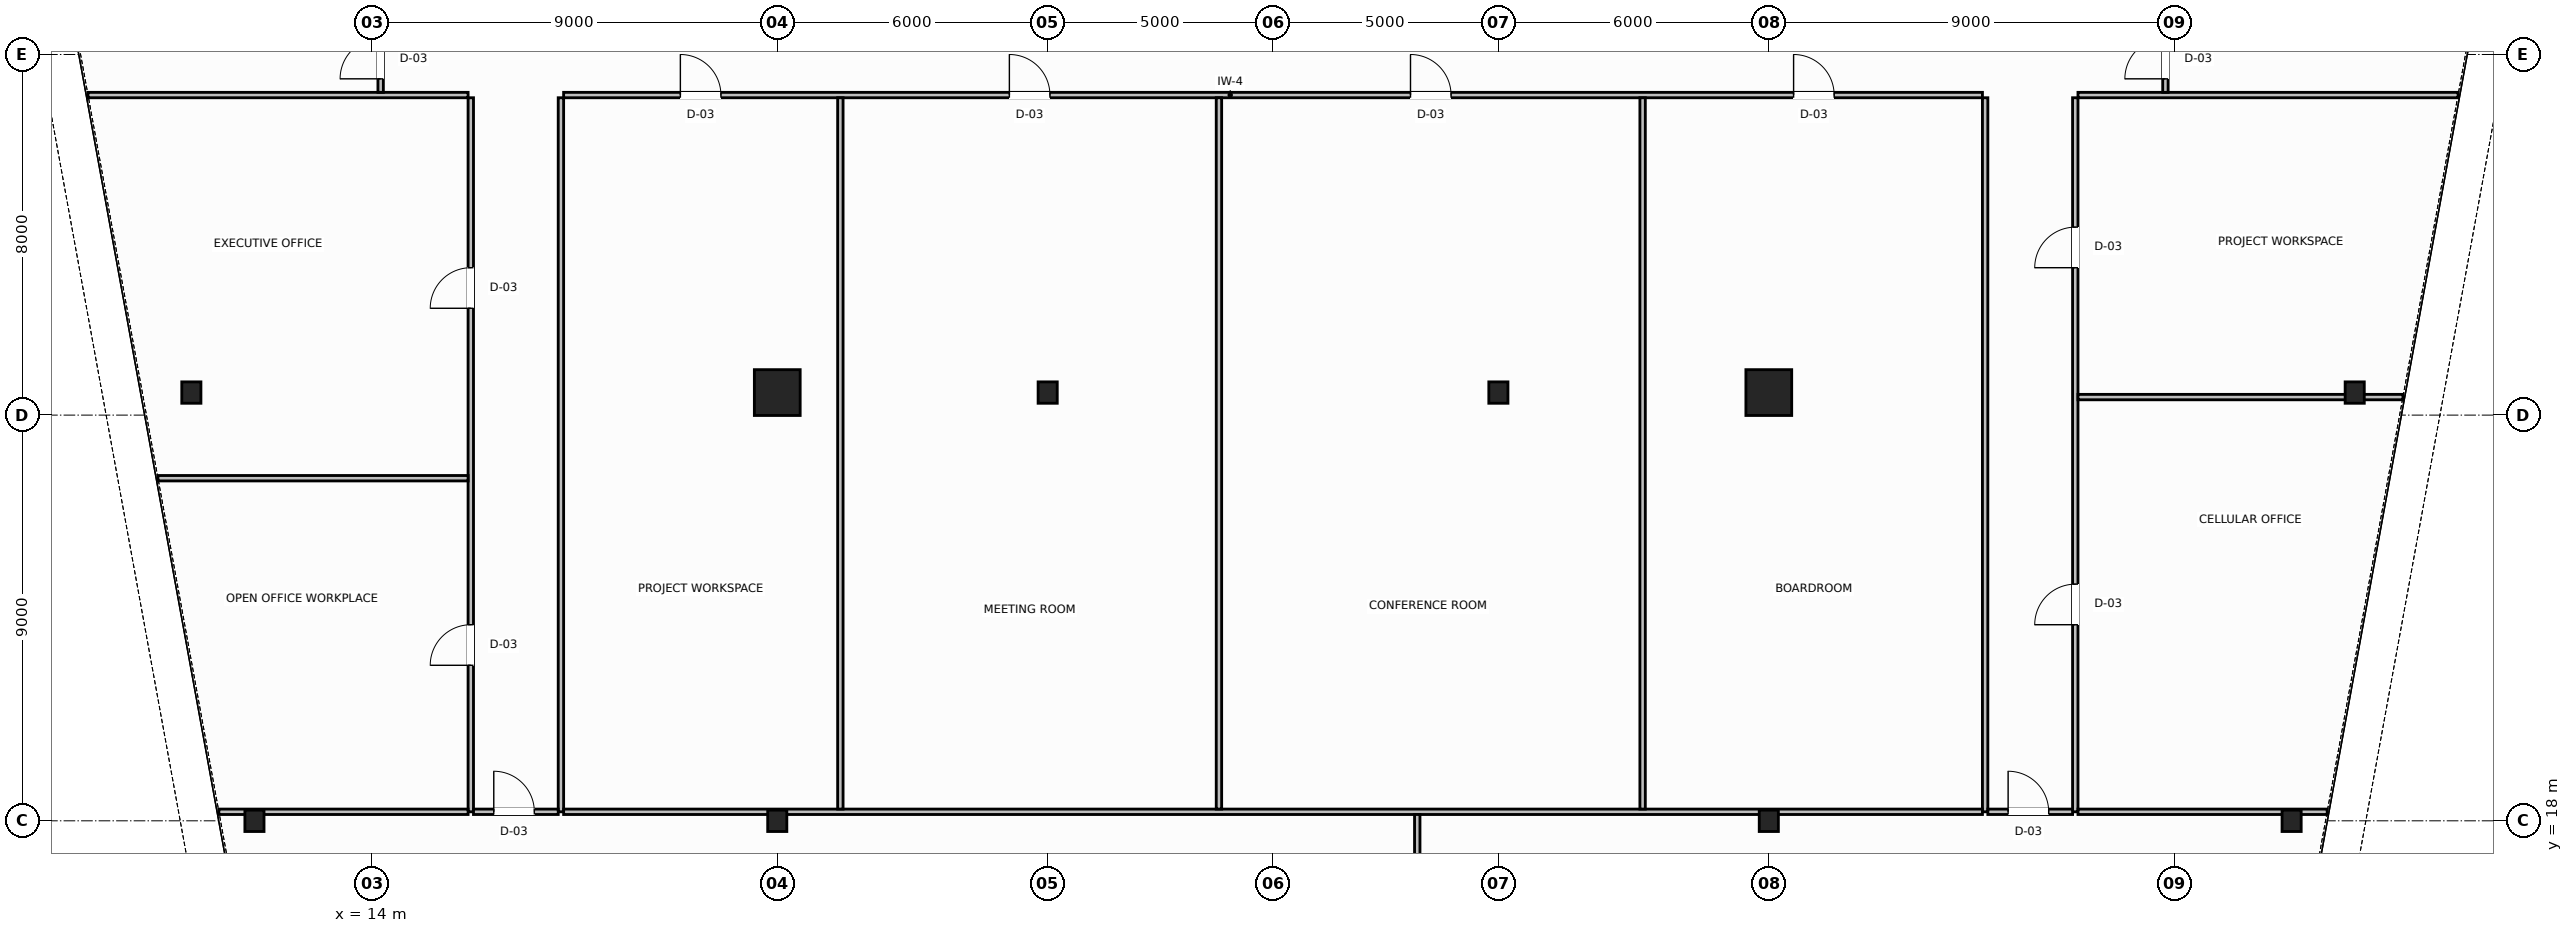
"""IFC4 building model, lengths in metres.
Left out: names, types, materials, properties, quantities, classifications, styles, units other than length and angle.
Written with IfcOpenShell. Run it as: python <this file> out.ifc"""

import sys

from ifc_helpers import new_model, si_unit, direction, frame, frame_2d, origin, origin_2d, place, context, subcontext, project, spatial, rectangle, hollow_circle, i_section, extrude, source, transform, mapped, element, fill, save


model = new_model("IFC4")
c1 = context("Model", 3, precision=1e-05, world=origin(), true_north=direction((0.0, 1.0)))
c2 = subcontext(c1, "Body", "Model", "MODEL_VIEW")
j1 = project(units=[si_unit("LENGTHUNIT", "METRE"), si_unit("PLANEANGLEUNIT", "RADIAN")], contexts=[c1])
p1 = place(None, origin())
s1 = spatial("IfcSite", under=j1, at=p1, CompositionType="ELEMENT")
p2 = place(p1, origin())
s2 = spatial("IfcBuilding", under=s1, at=p2, CompositionType="ELEMENT")
p3 = place(p2, frame((0.0, 0.0, 92.0)))
s3 = spatial("IfcBuildingStorey", under=s2, at=p3, CompositionType="ELEMENT", Elevation=92.0)
m1 = source(origin(), c2, "Body", "SweptSolid", [
    extrude(i_section(OverallWidth=0.424, OverallDepth=0.474, WebThickness=0.047, FlangeThickness=0.065, FilletRadius=0.015, at=origin_2d()), origin(), (0.0, 0.0, 1.0), 3.8),
])
for number, where, z_axis, x_axis in (
    (1, (10.0, 27.5, 0.0), (0.0, 0.0, 1.0), (1.0, 0.0, 0.0)),
    (2, (11.4, 18.0, 0.0), (0.0, 0.0, 1.0), (1.0, 0.0, 0.0)),
    (3, (58.0, 27.5, 0.0), (0.0, 0.0, 1.0), (1.0, 0.0, 0.0)),
    (4, (56.6, 18.0, 0.0), (0.0, 0.0, 1.0), (1.0, 0.0, 0.0)),
):
    element("IfcColumn", number, at=place(p3, frame(where, z_axis=z_axis, x_axis=x_axis)), inside=s3, PredefinedType="COLUMN", context=c2, shape_type="MappedRepresentation", body=[
        mapped(m1, transform((0.0, 0.0, 0.0), scale=1.0)),
    ])
m2 = source(origin(), c2, "Body", "SweptSolid", [
    extrude(hollow_circle(Radius=0.508, WallThickness=0.045, at=origin_2d()), origin(), (0.0, 0.0, 1.0), 3.8),
])
p4 = place(p3, frame((23.0, 27.5, 0.0), z_axis=(0.0, 0.0, 1.0), x_axis=(1.0, 0.0, 0.0)))
e5 = element("IfcColumn", 5, at=p4, inside=s3, PredefinedType="COLUMN", context=c2, shape_type="MappedRepresentation", body=[
    mapped(m2, transform((0.0, 0.0, 0.0), scale=1.0)),
])
m3 = source(origin(), c2, "Body", "SweptSolid", [
    extrude(i_section(OverallWidth=0.424, OverallDepth=0.474, WebThickness=0.047, FlangeThickness=0.065, FilletRadius=0.015, at=origin_2d()), origin(), (0.0, 0.0, 1.0), 3.8),
])
for number, where, z_axis, x_axis in (
    (6, (29.0, 27.5, 0.0), (0.0, 0.0, 1.0), (1.0, 0.0, 0.0)),
    (7, (39.0, 27.5, 0.0), (0.0, 0.0, 1.0), (1.0, 0.0, 0.0)),
):
    element("IfcColumn", number, at=place(p3, frame(where, z_axis=z_axis, x_axis=x_axis)), inside=s3, PredefinedType="COLUMN", context=c2, shape_type="MappedRepresentation", body=[
        mapped(m3, transform((0.0, 0.0, 0.0), scale=1.0)),
    ])
p5 = place(p3, frame((45.0, 27.5, 0.0), z_axis=(0.0, 0.0, 1.0), x_axis=(1.0, 0.0, 0.0)))
e8 = element("IfcColumn", 8, at=p5, inside=s3, PredefinedType="COLUMN", context=c2, shape_type="MappedRepresentation", body=[
    mapped(m2, transform((0.0, 0.0, 0.0), scale=1.0)),
])
for number, where, z_axis, x_axis in (
    (9, (23.0, 18.0, 0.0), (0.0, 0.0, 1.0), (1.0, 0.0, 0.0)),
    (10, (45.0, 18.0, 0.0), (0.0, 0.0, 1.0), (1.0, 0.0, 0.0)),
):
    element("IfcColumn", number, at=place(p3, frame(where, z_axis=z_axis, x_axis=x_axis)), inside=s3, PredefinedType="COLUMN", context=c2, shape_type="MappedRepresentation", body=[
        mapped(m3, transform((0.0, 0.0, 0.0), scale=1.0)),
    ])
p6 = place(p3, frame((18.26, 34.1, 0.0), z_axis=(0.0, 0.0, 1.0), x_axis=(1.0, 0.0, 0.0)))
e11 = element("IfcWall", 11, at=p6, inside=s3, PredefinedType="PARTITIONING", context=c2, shape_type="SweptSolid", body=[
    extrude(rectangle(XDim=31.48, YDim=0.12, at=frame_2d((15.74, 0.0))), origin(), (0.0, 0.0, 1.0), 3.58),
])
p7 = place(p6, frame((2.59, 0.0, 0.0)))
e12 = element("IfcOpeningElement", 12, at=p7, cuts=e11, PredefinedType="OPENING", context=c2, shape_type="SweptSolid", body=[
    extrude(rectangle(XDim=0.9, YDim=2.15, at=frame_2d((0.45, 1.075))), frame((0.0, 0.07, 0.0), z_axis=(0.0, -1.0, 0.0), x_axis=(1.0, 0.0, 0.0)), (0.0, 0.0, 1.0), 0.14),
])
p8 = place(p6, frame((9.89, 0.0, 0.0)))
e13 = element("IfcOpeningElement", 13, at=p8, cuts=e11, PredefinedType="OPENING", context=c2, shape_type="SweptSolid", body=[
    extrude(rectangle(XDim=0.9, YDim=2.15, at=frame_2d((0.45, 1.075))), frame((0.0, 0.07, 0.0), z_axis=(0.0, -1.0, 0.0), x_axis=(1.0, 0.0, 0.0)), (0.0, 0.0, 1.0), 0.14),
])
p9 = place(p6, frame((18.79, 0.0, 0.0)))
e14 = element("IfcOpeningElement", 14, at=p9, cuts=e11, PredefinedType="OPENING", context=c2, shape_type="SweptSolid", body=[
    extrude(rectangle(XDim=0.9, YDim=2.15, at=frame_2d((0.45, 1.075))), frame((0.0, 0.07, 0.0), z_axis=(0.0, -1.0, 0.0), x_axis=(1.0, 0.0, 0.0)), (0.0, 0.0, 1.0), 0.14),
])
p10 = place(p6, frame((27.29, 0.0, 0.0)))
e15 = element("IfcOpeningElement", 15, at=p10, cuts=e11, PredefinedType="OPENING", context=c2, shape_type="SweptSolid", body=[
    extrude(rectangle(XDim=0.9, YDim=2.15, at=frame_2d((0.45, 1.075))), frame((0.0, 0.07, 0.0), z_axis=(0.0, -1.0, 0.0), x_axis=(1.0, 0.0, 0.0)), (0.0, 0.0, 1.0), 0.14),
])
for number, where, z_axis, x_axis in (
    (16, (7.706, 34.1, 0.0), (0.0, 0.0, 1.0), (1.0, 0.0, 0.0)),
    (17, (51.86, 34.1, 0.0), (0.0, 0.0, 1.0), (1.0, 0.0, 0.0)),
):
    element("IfcWall", number, at=place(p3, frame(where, z_axis=z_axis, x_axis=x_axis)), inside=s3, PredefinedType="PARTITIONING", context=c2, shape_type="SweptSolid", body=[
        extrude(rectangle(XDim=8.434, YDim=0.12, at=frame_2d((4.217, 0.0))), origin(), (0.0, 0.0, 1.0), 3.58),
    ])
p11 = place(p3, frame((14.2, 34.16, 0.0), z_axis=(0.0, 0.0, 1.0), x_axis=(0.0, 1.0, 0.0)))
e18 = element("IfcWall", 18, at=p11, inside=s3, PredefinedType="PARTITIONING", context=c2, shape_type="SweptSolid", body=[
    extrude(rectangle(XDim=2.28, YDim=0.12, at=frame_2d((1.14, 0.0))), origin(), (0.0, 0.0, 1.0), 3.58),
])
p12 = place(p11, frame((0.3, 0.0, 0.0)))
e19 = element("IfcOpeningElement", 19, at=p12, cuts=e18, PredefinedType="OPENING", context=c2, shape_type="SweptSolid", body=[
    extrude(rectangle(XDim=0.9, YDim=2.15, at=frame_2d((0.45, 1.075))), frame((0.0, 0.07, 0.0), z_axis=(0.0, -1.0, 0.0), x_axis=(1.0, 0.0, 0.0)), (0.0, 0.0, 1.0), 0.14),
])
p13 = place(p3, frame((53.8, 34.16, 0.0), z_axis=(0.0, 0.0, 1.0), x_axis=(0.0, 1.0, 0.0)))
e20 = element("IfcWall", 20, at=p13, inside=s3, PredefinedType="PARTITIONING", context=c2, shape_type="SweptSolid", body=[
    extrude(rectangle(XDim=2.28, YDim=0.12, at=frame_2d((1.14, 0.0))), origin(), (0.0, 0.0, 1.0), 3.58),
])
p14 = place(p13, frame((0.3, 0.0, 0.0)))
e21 = element("IfcOpeningElement", 21, at=p14, cuts=e20, PredefinedType="OPENING", context=c2, shape_type="SweptSolid", body=[
    extrude(rectangle(XDim=0.9, YDim=2.15, at=frame_2d((0.45, 1.075))), frame((0.0, 0.07, 0.0), z_axis=(0.0, -1.0, 0.0), x_axis=(1.0, 0.0, 0.0)), (0.0, 0.0, 1.0), 0.14),
])
p15 = place(p3, frame((16.2, 18.2, 0.0), z_axis=(0.0, 0.0, 1.0), x_axis=(0.0, 1.0, 0.0)))
e22 = element("IfcWall", 22, at=p15, inside=s3, PredefinedType="PARTITIONING", context=c2, shape_type="SweptSolid", body=[
    extrude(rectangle(XDim=15.84, YDim=0.12, at=frame_2d((7.92, 0.0))), origin(), (0.0, 0.0, 1.0), 3.58),
])
p16 = place(p15, frame((3.25, 0.0, 0.0)))
e23 = element("IfcOpeningElement", 23, at=p16, cuts=e22, PredefinedType="OPENING", context=c2, shape_type="SweptSolid", body=[
    extrude(rectangle(XDim=0.9, YDim=2.15, at=frame_2d((0.45, 1.075))), frame((0.0, 0.07, 0.0), z_axis=(0.0, -1.0, 0.0), x_axis=(1.0, 0.0, 0.0)), (0.0, 0.0, 1.0), 0.14),
])
p17 = place(p15, frame((11.17, 0.0, 0.0)))
e24 = element("IfcOpeningElement", 24, at=p17, cuts=e22, PredefinedType="OPENING", context=c2, shape_type="SweptSolid", body=[
    extrude(rectangle(XDim=0.9, YDim=2.15, at=frame_2d((0.45, 1.075))), frame((0.0, 0.07, 0.0), z_axis=(0.0, -1.0, 0.0), x_axis=(1.0, 0.0, 0.0)), (0.0, 0.0, 1.0), 0.14),
])
for number, where, z_axis, x_axis in (
    (25, (18.2, 18.2, 0.0), (0.0, 0.0, 1.0), (0.0, 1.0, 0.0)),
    (26, (49.8, 18.2, 0.0), (0.0, 0.0, 1.0), (0.0, 1.0, 0.0)),
):
    element("IfcWall", number, at=place(p3, frame(where, z_axis=z_axis, x_axis=x_axis)), inside=s3, PredefinedType="PARTITIONING", context=c2, shape_type="SweptSolid", body=[
        extrude(rectangle(XDim=15.84, YDim=0.12, at=frame_2d((7.92, 0.0))), origin(), (0.0, 0.0, 1.0), 3.58),
    ])
p18 = place(p3, frame((51.8, 18.2, 0.0), z_axis=(0.0, 0.0, 1.0), x_axis=(0.0, 1.0, 0.0)))
e27 = element("IfcWall", 27, at=p18, inside=s3, PredefinedType="PARTITIONING", context=c2, shape_type="SweptSolid", body=[
    extrude(rectangle(XDim=15.84, YDim=0.12, at=frame_2d((7.92, 0.0))), origin(), (0.0, 0.0, 1.0), 3.58),
])
p19 = place(p18, frame((4.15, 0.0, 0.0)))
e28 = element("IfcOpeningElement", 28, at=p19, cuts=e27, PredefinedType="OPENING", context=c2, shape_type="SweptSolid", body=[
    extrude(rectangle(XDim=0.9, YDim=2.15, at=frame_2d((0.45, 1.075))), frame((0.0, 0.07, 0.0), z_axis=(0.0, -1.0, 0.0), x_axis=(1.0, 0.0, 0.0)), (0.0, 0.0, 1.0), 0.14),
])
p20 = place(p18, frame((12.07, 0.0, 0.0)))
e29 = element("IfcOpeningElement", 29, at=p20, cuts=e27, PredefinedType="OPENING", context=c2, shape_type="SweptSolid", body=[
    extrude(rectangle(XDim=0.9, YDim=2.15, at=frame_2d((0.45, 1.075))), frame((0.0, 0.07, 0.0), z_axis=(0.0, -1.0, 0.0), x_axis=(1.0, 0.0, 0.0)), (0.0, 0.0, 1.0), 0.14),
])
p21 = place(p3, frame((16.26, 18.2, 0.0), z_axis=(0.0, 0.0, 1.0), x_axis=(1.0, 0.0, 0.0)))
e30 = element("IfcWall", 30, at=p21, inside=s3, PredefinedType="PARTITIONING", context=c2, shape_type="SweptSolid", body=[
    extrude(rectangle(XDim=1.88, YDim=0.12, at=frame_2d((0.94, 0.0))), origin(), (0.0, 0.0, 1.0), 2.87),
])
p22 = place(p21, frame((0.45, 0.0, 0.0)))
e31 = element("IfcOpeningElement", 31, at=p22, cuts=e30, PredefinedType="OPENING", context=c2, shape_type="SweptSolid", body=[
    extrude(rectangle(XDim=0.9, YDim=2.15, at=frame_2d((0.45, 1.075))), frame((0.0, 0.07, 0.0), z_axis=(0.0, -1.0, 0.0), x_axis=(1.0, 0.0, 0.0)), (0.0, 0.0, 1.0), 0.14),
])
p23 = place(p3, frame((49.86, 18.2, 0.0), z_axis=(0.0, 0.0, 1.0), x_axis=(1.0, 0.0, 0.0)))
e32 = element("IfcWall", 32, at=p23, inside=s3, PredefinedType="PARTITIONING", context=c2, shape_type="SweptSolid", body=[
    extrude(rectangle(XDim=1.88, YDim=0.12, at=frame_2d((0.94, 0.0))), origin(), (0.0, 0.0, 1.0), 2.87),
])
p24 = place(p23, frame((0.45, 0.0, 0.0)))
e33 = element("IfcOpeningElement", 33, at=p24, cuts=e32, PredefinedType="OPENING", context=c2, shape_type="SweptSolid", body=[
    extrude(rectangle(XDim=0.9, YDim=2.15, at=frame_2d((0.45, 1.075))), frame((0.0, 0.07, 0.0), z_axis=(0.0, -1.0, 0.0), x_axis=(1.0, 0.0, 0.0)), (0.0, 0.0, 1.0), 0.14),
])
p25 = place(p3, frame((10.61, 18.2, 0.0), z_axis=(0.0, 0.0, 1.0), x_axis=(1.0, 0.0, 0.0)))
e34 = element("IfcWall", 34, at=p25, inside=s3, PredefinedType="PARTITIONING", context=c2, shape_type="SweptSolid", body=[
    extrude(rectangle(XDim=5.53, YDim=0.12, at=frame_2d((2.765, 0.0))), origin(), (0.0, 0.0, 1.0), 2.87),
])
p26 = place(p3, frame((9.259, 25.6, 0.0), z_axis=(0.0, 0.0, 1.0), x_axis=(1.0, 0.0, 0.0)))
e35 = element("IfcWall", 35, at=p26, inside=s3, PredefinedType="PARTITIONING", context=c2, shape_type="SweptSolid", body=[
    extrude(rectangle(XDim=6.881, YDim=0.12, at=frame_2d((3.44, 0.0))), origin(), (0.0, 0.0, 1.0), 3.58),
])
p27 = place(p3, frame((51.86, 18.2, 0.0), z_axis=(0.0, 0.0, 1.0), x_axis=(1.0, 0.0, 0.0)))
e36 = element("IfcWall", 36, at=p27, inside=s3, PredefinedType="PARTITIONING", context=c2, shape_type="SweptSolid", body=[
    extrude(rectangle(XDim=5.53, YDim=0.12, at=frame_2d((2.765, 0.0))), origin(), (0.0, 0.0, 1.0), 2.87),
])
p28 = place(p3, frame((51.86, 27.4, 0.0), z_axis=(0.0, 0.0, 1.0), x_axis=(1.0, 0.0, 0.0)))
e37 = element("IfcWall", 37, at=p28, inside=s3, PredefinedType="PARTITIONING", context=c2, shape_type="SweptSolid", body=[
    extrude(rectangle(XDim=7.21, YDim=0.12, at=frame_2d((3.605, 0.0))), origin(), (0.0, 0.0, 1.0), 2.87),
])
p29 = place(p3, frame((18.26, 18.2, 0.0), z_axis=(0.0, 0.0, 1.0), x_axis=(1.0, 0.0, 0.0)))
e38 = element("IfcWall", 38, at=p29, inside=s3, PredefinedType="PARTITIONING", context=c2, shape_type="SweptSolid", body=[
    extrude(rectangle(XDim=31.48, YDim=0.12, at=frame_2d((15.74, 0.0))), origin(), (0.0, 0.0, 1.0), 2.87),
])
for number, where, z_axis, x_axis in (
    (39, (24.4, 18.26, 0.0), (0.0, 0.0, 1.0), (0.0, 1.0, 0.0)),
    (40, (32.8, 18.26, 0.0), (0.0, 0.0, 1.0), (0.0, 1.0, 0.0)),
    (41, (42.2, 18.26, 0.0), (0.0, 0.0, 1.0), (0.0, 1.0, 0.0)),
):
    element("IfcWall", number, at=place(p3, frame(where, z_axis=z_axis, x_axis=x_axis)), inside=s3, PredefinedType="PARTITIONING", context=c2, shape_type="SweptSolid", body=[
        extrude(rectangle(XDim=15.78, YDim=0.12, at=frame_2d((7.89, 0.0))), origin(), (0.0, 0.0, 1.0), 3.58),
    ])
p30 = place(p3, frame((37.2, 8.187, 0.0), z_axis=(0.0, 0.0, 1.0), x_axis=(0.0, 1.0, 0.0)))
e42 = element("IfcWall", 42, at=p30, inside=s3, PredefinedType="PARTITIONING", context=c2, shape_type="SweptSolid", body=[
    extrude(rectangle(XDim=9.953, YDim=0.12, at=frame_2d((4.977, 0.0))), origin(), (0.0, 0.0, 1.0), 3.58),
])
p31 = place(p30, frame((4.526, 0.0, 0.0)))
e43 = element("IfcOpeningElement", 43, at=p31, cuts=e42, PredefinedType="OPENING", context=c2, shape_type="SweptSolid", body=[
    extrude(rectangle(XDim=0.9, YDim=2.15, at=frame_2d((0.45, 1.075))), frame((0.0, 0.07, 0.0), z_axis=(0.0, -1.0, 0.0), x_axis=(1.0, 0.0, 0.0)), (0.0, 0.0, 1.0), 0.14),
])
m4 = source(origin(), c2, "Body", "SweptSolid", [
    extrude(rectangle(XDim=0.9, YDim=2.15, at=frame_2d((0.45, 1.075))), frame((0.0, 0.025, 0.0), z_axis=(0.0, -1.0, 0.0), x_axis=(1.0, 0.0, 0.0)), (0.0, 0.0, 1.0), 0.05),
])
p32 = place(p12, origin())
e44 = element("IfcDoor", 44, at=p32, inside=s3, OperationType="SINGLE_SWING_LEFT", PredefinedType="DOOR", context=c2, shape_type="MappedRepresentation", body=[
    mapped(m4, transform((0.0, 0.0, 0.0), scale=1.0)),
])
fill(e19, e44)
p33 = place(p14, origin())
e45 = element("IfcDoor", 45, at=p33, inside=s3, OperationType="SINGLE_SWING_RIGHT", PredefinedType="DOOR", context=c2, shape_type="MappedRepresentation", body=[
    mapped(m4, transform((0.0, 0.0, 0.0), scale=1.0)),
])
fill(e21, e45)
p34 = place(p16, origin())
e46 = element("IfcDoor", 46, at=p34, inside=s3, OperationType="SINGLE_SWING_LEFT", PredefinedType="DOOR", context=c2, shape_type="MappedRepresentation", body=[
    mapped(m4, transform((0.0, 0.0, 0.0), scale=1.0)),
])
fill(e23, e46)
p35 = place(p17, origin())
e47 = element("IfcDoor", 47, at=p35, inside=s3, OperationType="SINGLE_SWING_RIGHT", PredefinedType="DOOR", context=c2, shape_type="MappedRepresentation", body=[
    mapped(m4, transform((0.0, 0.0, 0.0), scale=1.0)),
])
fill(e24, e47)
p36 = place(p19, origin())
e48 = element("IfcDoor", 48, at=p36, inside=s3, OperationType="SINGLE_SWING_RIGHT", PredefinedType="DOOR", context=c2, shape_type="MappedRepresentation", body=[
    mapped(m4, transform((0.0, 0.0, 0.0), scale=1.0)),
])
fill(e28, e48)
p37 = place(p20, origin())
e49 = element("IfcDoor", 49, at=p37, inside=s3, OperationType="SINGLE_SWING_LEFT", PredefinedType="DOOR", context=c2, shape_type="MappedRepresentation", body=[
    mapped(m4, transform((0.0, 0.0, 0.0), scale=1.0)),
])
fill(e29, e49)
p38 = place(p7, origin())
e50 = element("IfcDoor", 50, at=p38, inside=s3, OperationType="SINGLE_SWING_LEFT", PredefinedType="DOOR", context=c2, shape_type="MappedRepresentation", body=[
    mapped(m4, transform((0.0, 0.0, 0.0), scale=1.0)),
])
fill(e12, e50)
p39 = place(p8, origin())
e51 = element("IfcDoor", 51, at=p39, inside=s3, OperationType="SINGLE_SWING_RIGHT", PredefinedType="DOOR", context=c2, shape_type="MappedRepresentation", body=[
    mapped(m4, transform((0.0, 0.0, 0.0), scale=1.0)),
])
fill(e13, e51)
p40 = place(p9, origin())
e52 = element("IfcDoor", 52, at=p40, inside=s3, OperationType="SINGLE_SWING_LEFT", PredefinedType="DOOR", context=c2, shape_type="MappedRepresentation", body=[
    mapped(m4, transform((0.0, 0.0, 0.0), scale=1.0)),
])
fill(e14, e52)
p41 = place(p10, origin())
e53 = element("IfcDoor", 53, at=p41, inside=s3, OperationType="SINGLE_SWING_RIGHT", PredefinedType="DOOR", context=c2, shape_type="MappedRepresentation", body=[
    mapped(m4, transform((0.0, 0.0, 0.0), scale=1.0)),
])
fill(e15, e53)
p42 = place(p22, origin())
e54 = element("IfcDoor", 54, at=p42, inside=s3, OperationType="SINGLE_SWING_LEFT", PredefinedType="DOOR", context=c2, shape_type="MappedRepresentation", body=[
    mapped(m4, transform((0.0, 0.0, 0.0), scale=1.0)),
])
fill(e31, e54)
p43 = place(p24, origin())
e55 = element("IfcDoor", 55, at=p43, inside=s3, OperationType="SINGLE_SWING_RIGHT", PredefinedType="DOOR", context=c2, shape_type="MappedRepresentation", body=[
    mapped(m4, transform((0.0, 0.0, 0.0), scale=1.0)),
])
fill(e33, e55)
save(model, sys.argv[1])
